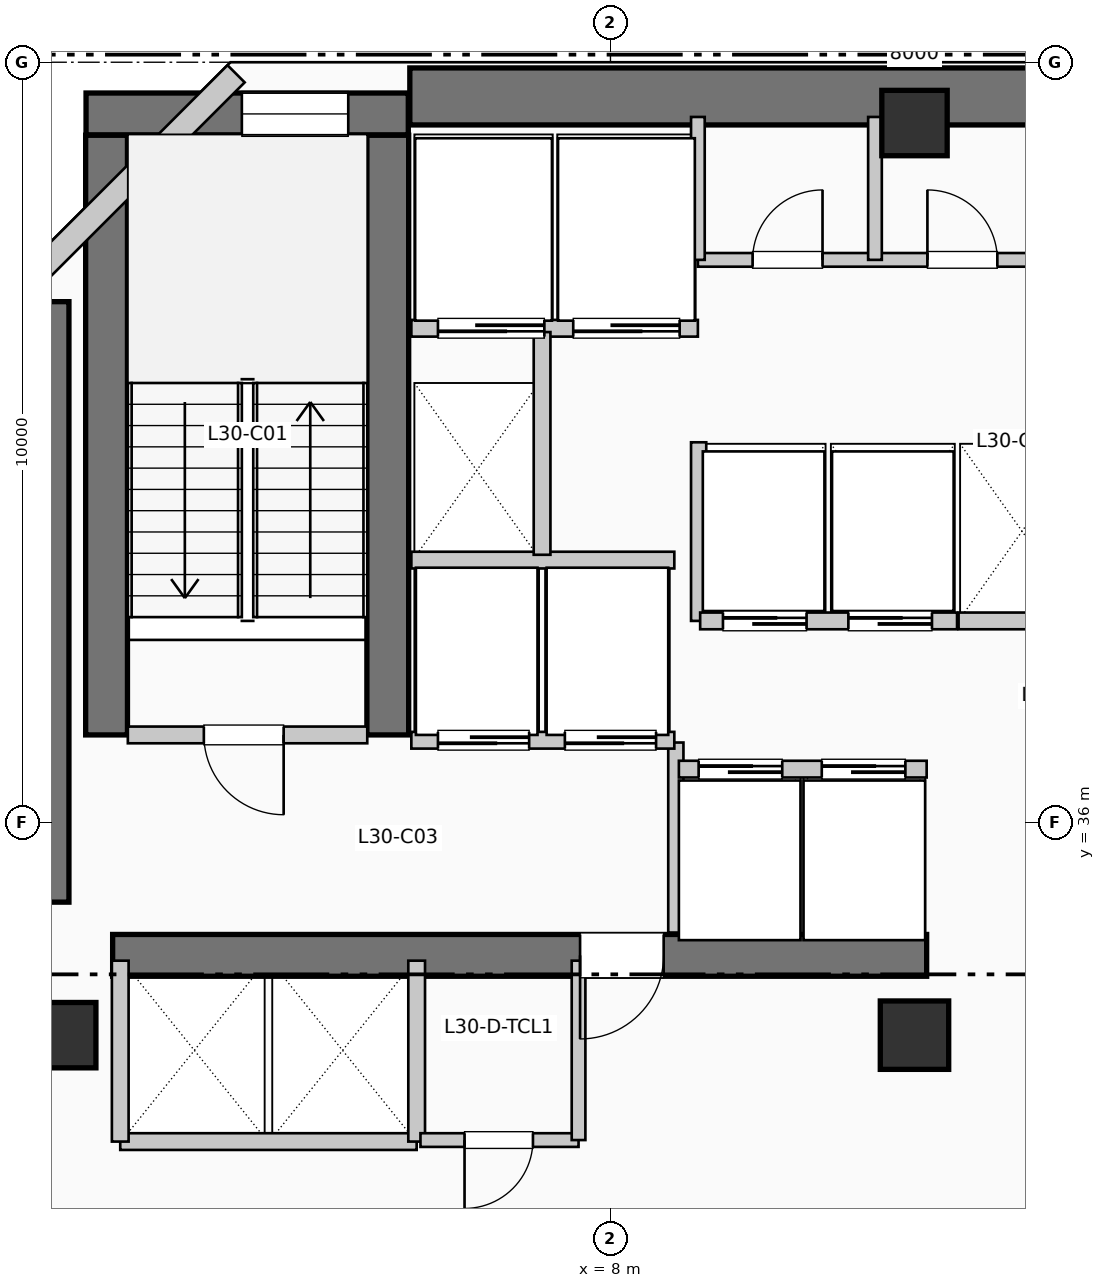
"""IFC4 building model, lengths in metres.
Left out: names, types, materials, properties, quantities, classifications, styles, units other than length and angle.
Written with IfcOpenShell. Run it as: python <this file> out.ifc"""

import sys

from ifc_helpers import new_model, si_unit, direction, frame, frame_2d, origin, origin_2d, place, context, subcontext, project, spatial, rectangle, extrude, element, fill, save


model = new_model("IFC4")
c1 = context("Model", 3, precision=1e-05, world=origin(), true_north=direction((0.0, 1.0)))
c2 = subcontext(c1, "Body", "Model", "MODEL_VIEW")
j1 = project(units=[si_unit("LENGTHUNIT", "METRE"), si_unit("PLANEANGLEUNIT", "RADIAN")], contexts=[c1])
p1 = place(None, origin())
s1 = spatial("IfcSite", under=j1, at=p1, CompositionType="ELEMENT")
p2 = place(p1, origin())
s2 = spatial("IfcBuilding", under=s1, at=p2, CompositionType="ELEMENT")
p3 = place(p2, frame((0.0, 0.0, 126.39)))
s3 = spatial("IfcBuildingStorey", under=s2, at=p3, CompositionType="ELEMENT", Elevation=126.39)
p4 = place(p3, frame((5.36, 45.55, 0.0), z_axis=(0.0, 0.0, 1.0), x_axis=(1.0, 0.0, 0.0)))
e1 = element("IfcWall", 1, at=p4, inside=s3, PredefinedType="SHEAR", context=c2, shape_type="SweptSolid", body=[
    extrude(rectangle(XDim=13.98, YDim=0.75, at=frame_2d((6.99, 0.0))), origin(), (0.0, 0.0, 1.0), 3.96),
])
p5 = place(p3, frame((0.5, 34.95, 0.0), z_axis=(0.0, 0.0, 1.0), x_axis=(0.0, 1.0, 0.0)))
e2 = element("IfcWall", 2, at=p5, inside=s3, PredefinedType="SHEAR", context=c2, shape_type="SweptSolid", body=[
    extrude(rectangle(XDim=7.9, YDim=0.75, at=frame_2d((3.95, 0.0))), origin(), (0.0, 0.0, 1.0), 3.96),
])
p6 = place(p3, frame((1.45, 34.25, 0.0), z_axis=(0.0, 0.0, 1.0), x_axis=(1.0, 0.0, 0.0)))
e3 = element("IfcWall", 3, at=p6, inside=s3, PredefinedType="SHEAR", context=c2, shape_type="SweptSolid", body=[
    extrude(rectangle(XDim=10.71, YDim=0.55, at=frame_2d((5.355, 0.0))), origin(), (0.0, 0.0, 1.0), 3.96),
])
p7 = place(p6, frame((7.25, 0.0, 0.0), z_axis=(0.0, 0.0, 1.0), x_axis=(-1.0, 0.0, 0.0)))
e4 = element("IfcOpeningElement", 4, at=p7, cuts=e3, PredefinedType="OPENING", context=c2, shape_type="SweptSolid", body=[
    extrude(rectangle(XDim=1.1, YDim=2.15, at=frame_2d((0.55, 1.075))), frame((0.0, 0.285, 0.0), z_axis=(0.0, -1.0, 0.0), x_axis=(1.0, 0.0, 0.0)), (0.0, 0.0, 1.0), 0.57),
])
for number, where, z_axis, x_axis in (
    (5, (1.37, 37.15, 0.0), (0.0, 0.0, 1.0), (0.0, 1.0, 0.0)),
    (6, (5.07, 37.15, 0.0), (0.0, 0.0, 1.0), (0.0, 1.0, 0.0)),
):
    element("IfcWall", number, at=place(p3, frame(where, z_axis=z_axis, x_axis=x_axis)), inside=s3, PredefinedType="SHEAR", context=c2, shape_type="SweptSolid", body=[
        extrude(rectangle(XDim=7.89, YDim=0.55, at=frame_2d((3.945, 0.0))), origin(), (0.0, 0.0, 1.0), 3.96),
    ])
p8 = place(p3, frame((1.1, 45.32, 0.0), z_axis=(0.0, 0.0, 1.0), x_axis=(1.0, 0.0, 0.0)))
e7 = element("IfcWall", 7, at=p8, inside=s3, PredefinedType="SHEAR", context=c2, shape_type="SweptSolid", body=[
    extrude(rectangle(XDim=4.24, YDim=0.55, at=frame_2d((2.12, 0.0))), origin(), (0.0, 0.0, 1.0), 3.96),
])
p9 = place(p8, frame((2.05, 0.0, 1.05)))
e8 = element("IfcOpeningElement", 8, at=p9, cuts=e7, PredefinedType="OPENING", context=c2, shape_type="SweptSolid", body=[
    extrude(rectangle(XDim=1.4, YDim=1.8, at=frame_2d((0.7, 0.9))), frame((0.0, 0.285, 0.0), z_axis=(0.0, -1.0, 0.0), x_axis=(1.0, 0.0, 0.0)), (0.0, 0.0, 1.0), 0.57),
])
p10 = place(p3, frame((0.8, 33.2, 0.0), z_axis=(0.0, 0.0, 1.0), x_axis=(1.0, 0.0, 0.0)))
e9 = element("IfcColumn", 9, at=p10, inside=s3, PredefinedType="COLUMN", context=c2, shape_type="SweptSolid", body=[
    extrude(rectangle(XDim=0.86, YDim=0.86, at=origin_2d()), origin(), (0.0, 0.0, 1.0), 3.96),
])
p11 = place(p3, frame((12.0, 33.2, 0.0), z_axis=(0.0, 0.0, 1.0), x_axis=(1.0, 0.0, 0.0)))
e10 = element("IfcColumn", 10, at=p11, inside=s3, PredefinedType="COLUMN", context=c2, shape_type="SweptSolid", body=[
    extrude(rectangle(XDim=0.9, YDim=0.9, at=origin_2d()), origin(), (0.0, 0.0, 1.0), 3.96),
])
p12 = place(p3, frame((12.0, 45.2, 0.0), z_axis=(0.0, 0.0, 1.0), x_axis=(1.0, 0.0, 0.0)))
e11 = element("IfcColumn", 11, at=p12, inside=s3, PredefinedType="COLUMN", context=c2, shape_type="SweptSolid", body=[
    extrude(rectangle(XDim=0.86, YDim=0.86, at=origin_2d()), origin(), (0.0, 0.0, 1.0), 3.96),
])
p13 = place(p3, frame((3.074, 45.848, 0.0), z_axis=(0.0, 0.0, 1.0), x_axis=(-0.707106781187, -0.707106781187, 0.0)))
e12 = element("IfcWall", 12, at=p13, inside=s3, PredefinedType="SOLIDWALL", context=c2, shape_type="SweptSolid", body=[
    extrude(rectangle(XDim=4.133, YDim=0.32, at=frame_2d((2.066, 0.0))), origin(), (0.0, 0.0, 1.0), 3.71),
])
p14 = place(p3, frame((1.65, 37.15, 0.0), z_axis=(0.0, 0.0, 1.0), x_axis=(1.0, 0.0, 0.0)))
e13 = element("IfcWall", 13, at=p14, inside=s3, PredefinedType="PARTITIONING", context=c2, shape_type="SweptSolid", body=[
    extrude(rectangle(XDim=3.15, YDim=0.22, at=frame_2d((1.575, 0.0))), origin(), (0.0, 0.0, 1.0), 3.71),
])
p15 = place(p14, frame((2.05, 0.0, 0.0), z_axis=(0.0, 0.0, 1.0), x_axis=(-1.0, 0.0, 0.0)))
e14 = element("IfcOpeningElement", 14, at=p15, cuts=e13, PredefinedType="OPENING", context=c2, shape_type="SweptSolid", body=[
    extrude(rectangle(XDim=1.05, YDim=2.15, at=frame_2d((0.525, 1.075))), frame((0.0, 0.12, 0.0), z_axis=(0.0, -1.0, 0.0), x_axis=(1.0, 0.0, 0.0)), (0.0, 0.0, 1.0), 0.24),
])
p16 = place(p3, frame((8.86, 34.55, 0.0), z_axis=(0.0, 0.0, 1.0), x_axis=(0.0, 1.0, 0.0)))
e15 = element("IfcWall", 15, at=p16, inside=s3, PredefinedType="PARTITIONING", context=c2, shape_type="SweptSolid", body=[
    extrude(rectangle(XDim=2.5, YDim=0.2, at=frame_2d((1.25, 0.0))), origin(), (0.0, 0.0, 1.0), 3.71),
])
p17 = place(p3, frame((5.38, 37.08, 0.0), z_axis=(0.0, 0.0, 1.0), x_axis=(1.0, 0.0, 0.0)))
e16 = element("IfcWall", 16, at=p17, inside=s3, PredefinedType="PARTITIONING", context=c2, shape_type="SweptSolid", body=[
    extrude(rectangle(XDim=3.46, YDim=0.22, at=frame_2d((1.73, 0.0))), origin(), (0.0, 0.0, 1.0), 3.71),
])
p18 = place(p17, frame((1.55, 0.0, 0.0), z_axis=(0.0, 0.0, 1.0), x_axis=(-1.0, 0.0, 0.0)))
e17 = element("IfcOpeningElement", 17, at=p18, cuts=e16, PredefinedType="OPENING", context=c2, shape_type="SweptSolid", body=[
    extrude(rectangle(XDim=1.2, YDim=2.2, at=frame_2d((0.6, 1.1))), frame((0.0, 0.12, 0.0), z_axis=(0.0, -1.0, 0.0), x_axis=(1.0, 0.0, 0.0)), (0.0, 0.0, 1.0), 0.24),
])
p19 = place(p17, frame((3.22, 0.0, 0.0), z_axis=(0.0, 0.0, 1.0), x_axis=(-1.0, 0.0, 0.0)))
e18 = element("IfcOpeningElement", 18, at=p19, cuts=e16, PredefinedType="OPENING", context=c2, shape_type="SweptSolid", body=[
    extrude(rectangle(XDim=1.2, YDim=2.2, at=frame_2d((0.6, 1.1))), frame((0.0, 0.12, 0.0), z_axis=(0.0, -1.0, 0.0), x_axis=(1.0, 0.0, 0.0)), (0.0, 0.0, 1.0), 0.24),
])
p20 = place(p3, frame((5.38, 39.45, 0.0), z_axis=(0.0, 0.0, 1.0), x_axis=(1.0, 0.0, 0.0)))
e19 = element("IfcWall", 19, at=p20, inside=s3, PredefinedType="PARTITIONING", context=c2, shape_type="SweptSolid", body=[
    extrude(rectangle(XDim=3.46, YDim=0.22, at=frame_2d((1.73, 0.0))), origin(), (0.0, 0.0, 1.0), 3.71),
])
p21 = place(p3, frame((5.38, 42.5, 0.0), z_axis=(0.0, 0.0, 1.0), x_axis=(1.0, 0.0, 0.0)))
e20 = element("IfcWall", 20, at=p21, inside=s3, PredefinedType="PARTITIONING", context=c2, shape_type="SweptSolid", body=[
    extrude(rectangle(XDim=3.77, YDim=0.22, at=frame_2d((1.885, 0.0))), origin(), (0.0, 0.0, 1.0), 3.71),
])
p22 = place(p21, frame((1.75, 0.0, 0.0), z_axis=(0.0, 0.0, 1.0), x_axis=(-1.0, 0.0, 0.0)))
e21 = element("IfcOpeningElement", 21, at=p22, cuts=e20, PredefinedType="OPENING", context=c2, shape_type="SweptSolid", body=[
    extrude(rectangle(XDim=1.4, YDim=2.2, at=frame_2d((0.7, 1.1))), frame((0.0, 0.12, 0.0), z_axis=(0.0, -1.0, 0.0), x_axis=(1.0, 0.0, 0.0)), (0.0, 0.0, 1.0), 0.24),
])
p23 = place(p21, frame((3.53, 0.0, 0.0), z_axis=(0.0, 0.0, 1.0), x_axis=(-1.0, 0.0, 0.0)))
e22 = element("IfcOpeningElement", 22, at=p23, cuts=e20, PredefinedType="OPENING", context=c2, shape_type="SweptSolid", body=[
    extrude(rectangle(XDim=1.4, YDim=2.2, at=frame_2d((0.7, 1.1))), frame((0.0, 0.12, 0.0), z_axis=(0.0, -1.0, 0.0), x_axis=(1.0, 0.0, 0.0)), (0.0, 0.0, 1.0), 0.24),
])
p24 = place(p3, frame((7.1, 39.52, 0.0), z_axis=(0.0, 0.0, 1.0), x_axis=(0.0, 1.0, 0.0)))
e23 = element("IfcWall", 23, at=p24, inside=s3, PredefinedType="PARTITIONING", context=c2, shape_type="SweptSolid", body=[
    extrude(rectangle(XDim=2.93, YDim=0.22, at=frame_2d((1.465, 0.0))), origin(), (0.0, 0.0, 1.0), 3.71),
])
p25 = place(p3, frame((1.55, 31.8, 0.0), z_axis=(0.0, 0.0, 1.0), x_axis=(1.0, 0.0, 0.0)))
e24 = element("IfcWall", 24, at=p25, inside=s3, PredefinedType="PARTITIONING", context=c2, shape_type="SweptSolid", body=[
    extrude(rectangle(XDim=3.9, YDim=0.22, at=frame_2d((1.95, 0.0))), origin(), (0.0, 0.0, 1.0), 3.71),
])
for number, where, z_axis, x_axis in (
    (25, (1.55, 31.8, 0.0), (0.0, 0.0, 1.0), (0.0, 1.0, 0.0)),
    (26, (5.45, 31.8, 0.0), (0.0, 0.0, 1.0), (0.0, 1.0, 0.0)),
):
    element("IfcWall", number, at=place(p3, frame(where, z_axis=z_axis, x_axis=x_axis)), inside=s3, PredefinedType="PARTITIONING", context=c2, shape_type="SweptSolid", body=[
        extrude(rectangle(XDim=2.38, YDim=0.22, at=frame_2d((1.19, 0.0))), origin(), (0.0, 0.0, 1.0), 3.71),
    ])
p26 = place(p3, frame((9.16, 38.65, 0.0), z_axis=(0.0, 0.0, 1.0), x_axis=(0.0, 1.0, 0.0)))
e27 = element("IfcWall", 27, at=p26, inside=s3, PredefinedType="PARTITIONING", context=c2, shape_type="SweptSolid", body=[
    extrude(rectangle(XDim=2.35, YDim=0.2, at=frame_2d((1.175, 0.0))), origin(), (0.0, 0.0, 1.0), 3.71),
])
p27 = place(p3, frame((5.5, 31.82, 0.0), z_axis=(0.0, 0.0, 1.0), x_axis=(1.0, 0.0, 0.0)))
e28 = element("IfcWall", 28, at=p27, inside=s3, PredefinedType="PLUMBINGWALL", context=c2, shape_type="SweptSolid", body=[
    extrude(rectangle(XDim=2.08, YDim=0.18, at=frame_2d((1.04, 0.0))), origin(), (0.0, 0.0, 1.0), 3.71),
])
p28 = place(p27, frame((1.48, 0.0, 0.0), z_axis=(0.0, 0.0, 1.0), x_axis=(-1.0, 0.0, 0.0)))
e29 = element("IfcOpeningElement", 29, at=p28, cuts=e28, PredefinedType="OPENING", context=c2, shape_type="SweptSolid", body=[
    extrude(rectangle(XDim=0.9, YDim=2.1, at=frame_2d((0.45, 1.05))), frame((0.0, 0.1, 0.0), z_axis=(0.0, -1.0, 0.0), x_axis=(1.0, 0.0, 0.0)), (0.0, 0.0, 1.0), 0.2),
])
p29 = place(p3, frame((7.58, 31.82, 0.0), z_axis=(0.0, 0.0, 1.0), x_axis=(0.0, 1.0, 0.0)))
e30 = element("IfcWall", 30, at=p29, inside=s3, PredefinedType="PLUMBINGWALL", context=c2, shape_type="SweptSolid", body=[
    extrude(rectangle(XDim=2.36, YDim=0.18, at=frame_2d((1.18, 0.0))), origin(), (0.0, 0.0, 1.0), 3.71),
])
p30 = place(p3, frame((8.9, 36.7, 0.0), z_axis=(0.0, 0.0, 1.0), x_axis=(1.0, 0.0, 0.0)))
e31 = element("IfcWall", 31, at=p30, inside=s3, PredefinedType="PARTITIONING", context=c2, shape_type="SweptSolid", body=[
    extrude(rectangle(XDim=3.26, YDim=0.22, at=frame_2d((1.63, 0.0))), origin(), (0.0, 0.0, 1.0), 3.71),
])
p31 = place(p30, frame((0.26, 0.0, 0.0)))
e32 = element("IfcOpeningElement", 32, at=p31, cuts=e31, PredefinedType="OPENING", context=c2, shape_type="SweptSolid", body=[
    extrude(rectangle(XDim=1.1, YDim=2.2, at=frame_2d((0.55, 1.1))), frame((0.0, 0.12, 0.0), z_axis=(0.0, -1.0, 0.0), x_axis=(1.0, 0.0, 0.0)), (0.0, 0.0, 1.0), 0.24),
])
p32 = place(p30, frame((1.88, 0.0, 0.0)))
e33 = element("IfcOpeningElement", 33, at=p32, cuts=e31, PredefinedType="OPENING", context=c2, shape_type="SweptSolid", body=[
    extrude(rectangle(XDim=1.1, YDim=2.2, at=frame_2d((0.55, 1.1))), frame((0.0, 0.12, 0.0), z_axis=(0.0, -1.0, 0.0), x_axis=(1.0, 0.0, 0.0)), (0.0, 0.0, 1.0), 0.24),
])
p33 = place(p3, frame((9.18, 38.65, 0.0), z_axis=(0.0, 0.0, 1.0), x_axis=(1.0, 0.0, 0.0)))
e34 = element("IfcWall", 34, at=p33, inside=s3, PredefinedType="PARTITIONING", context=c2, shape_type="SweptSolid", body=[
    extrude(rectangle(XDim=3.38, YDim=0.22, at=frame_2d((1.69, 0.0))), origin(), (0.0, 0.0, 1.0), 3.71),
])
p34 = place(p33, frame((0.3, 0.0, 0.0)))
e35 = element("IfcOpeningElement", 35, at=p34, cuts=e34, PredefinedType="OPENING", context=c2, shape_type="SweptSolid", body=[
    extrude(rectangle(XDim=1.1, YDim=2.2, at=frame_2d((0.55, 1.1))), frame((0.0, 0.12, 0.0), z_axis=(0.0, -1.0, 0.0), x_axis=(1.0, 0.0, 0.0)), (0.0, 0.0, 1.0), 0.24),
])
p35 = place(p33, frame((1.95, 0.0, 0.0)))
e36 = element("IfcOpeningElement", 36, at=p35, cuts=e34, PredefinedType="OPENING", context=c2, shape_type="SweptSolid", body=[
    extrude(rectangle(XDim=1.1, YDim=2.2, at=frame_2d((0.55, 1.1))), frame((0.0, 0.12, 0.0), z_axis=(0.0, -1.0, 0.0), x_axis=(1.0, 0.0, 0.0)), (0.0, 0.0, 1.0), 0.24),
])
p36 = place(p3, frame((12.58, 38.65, 0.0), z_axis=(0.0, 0.0, 1.0), x_axis=(1.0, 0.0, 0.0)))
e37 = element("IfcWall", 37, at=p36, inside=s3, PredefinedType="PARTITIONING", context=c2, shape_type="SweptSolid", body=[
    extrude(rectangle(XDim=3.38, YDim=0.22, at=frame_2d((1.69, 0.0))), origin(), (0.0, 0.0, 1.0), 3.71),
])
p37 = place(p3, frame((9.15, 43.4, 0.0), z_axis=(0.0, 0.0, 1.0), x_axis=(1.0, 0.0, 0.0)))
e38 = element("IfcWall", 38, at=p37, inside=s3, PredefinedType="PLUMBINGWALL", context=c2, shape_type="SweptSolid", body=[
    extrude(rectangle(XDim=9.33, YDim=0.18, at=frame_2d((4.665, 0.0))), origin(), (0.0, 0.0, 1.0), 3.71),
])
p38 = place(p37, frame((0.72, 0.0, 0.0)))
e39 = element("IfcOpeningElement", 39, at=p38, cuts=e38, PredefinedType="OPENING", context=c2, shape_type="SweptSolid", body=[
    extrude(rectangle(XDim=0.92, YDim=2.1, at=frame_2d((0.46, 1.05))), frame((0.0, 0.1, 0.0), z_axis=(0.0, -1.0, 0.0), x_axis=(1.0, 0.0, 0.0)), (0.0, 0.0, 1.0), 0.2),
])
p39 = place(p37, frame((3.02, 0.0, 0.0)))
e40 = element("IfcOpeningElement", 40, at=p39, cuts=e38, PredefinedType="OPENING", context=c2, shape_type="SweptSolid", body=[
    extrude(rectangle(XDim=0.92, YDim=2.1, at=frame_2d((0.46, 1.05))), frame((0.0, 0.1, 0.0), z_axis=(0.0, -1.0, 0.0), x_axis=(1.0, 0.0, 0.0)), (0.0, 0.0, 1.0), 0.2),
])
p40 = place(p37, frame((5.34, 0.0, 0.0)))
e41 = element("IfcOpeningElement", 41, at=p40, cuts=e38, PredefinedType="OPENING", context=c2, shape_type="SweptSolid", body=[
    extrude(rectangle(XDim=0.92, YDim=2.1, at=frame_2d((0.46, 1.05))), frame((0.0, 0.1, 0.0), z_axis=(0.0, -1.0, 0.0), x_axis=(1.0, 0.0, 0.0)), (0.0, 0.0, 1.0), 0.2),
])
p41 = place(p37, frame((7.66, 0.0, 0.0)))
e42 = element("IfcOpeningElement", 42, at=p41, cuts=e38, PredefinedType="OPENING", context=c2, shape_type="SweptSolid", body=[
    extrude(rectangle(XDim=0.95, YDim=2.1, at=frame_2d((0.475, 1.05))), frame((0.0, 0.1, 0.0), z_axis=(0.0, -1.0, 0.0), x_axis=(1.0, 0.0, 0.0)), (0.0, 0.0, 1.0), 0.2),
])
for number, where, z_axis, x_axis in (
    (43, (9.15, 43.4, 0.0), (0.0, 0.0, 1.0), (0.0, 1.0, 0.0)),
    (44, (11.48, 43.4, 0.0), (0.0, 0.0, 1.0), (0.0, 1.0, 0.0)),
):
    element("IfcWall", number, at=place(p3, frame(where, z_axis=z_axis, x_axis=x_axis)), inside=s3, PredefinedType="PLUMBINGWALL", context=c2, shape_type="SweptSolid", body=[
        extrude(rectangle(XDim=1.88, YDim=0.18, at=frame_2d((0.94, 0.0))), origin(), (0.0, 0.0, 1.0), 3.71),
    ])
p42 = place(p9, origin())
e45 = element("IfcWindow", 45, at=p42, inside=s3, PartitioningType="SINGLE_PANEL", PredefinedType="WINDOW", context=c2, shape_type="SweptSolid", body=[
    extrude(rectangle(XDim=1.4, YDim=1.8, at=frame_2d((0.7, 0.9))), frame((0.0, 0.03, 0.0), z_axis=(0.0, -1.0, 0.0), x_axis=(1.0, 0.0, 0.0)), (0.0, 0.0, 1.0), 0.06),
])
fill(e8, e45)
p43 = place(p15, origin())
e46 = element("IfcDoor", 46, at=p43, inside=s3, OperationType="SINGLE_SWING_RIGHT", PredefinedType="DOOR", context=c2, shape_type="SweptSolid", body=[
    extrude(rectangle(XDim=1.05, YDim=2.15, at=frame_2d((0.525, 1.075))), frame((0.0, 0.025, 0.0), z_axis=(0.0, -1.0, 0.0), x_axis=(1.0, 0.0, 0.0)), (0.0, 0.0, 1.0), 0.05),
])
fill(e14, e46)
p44 = place(p7, origin())
e47 = element("IfcDoor", 47, at=p44, inside=s3, OperationType="SINGLE_SWING_LEFT", PredefinedType="DOOR", context=c2, shape_type="SweptSolid", body=[
    extrude(rectangle(XDim=1.1, YDim=2.15, at=frame_2d((0.55, 1.075))), frame((0.0, 0.025, 0.0), z_axis=(0.0, -1.0, 0.0), x_axis=(1.0, 0.0, 0.0)), (0.0, 0.0, 1.0), 0.05),
])
fill(e4, e47)
p45 = place(p18, origin())
e48 = element("IfcDoor", 48, at=p45, inside=s3, OperationType="SLIDING_TO_RIGHT", PredefinedType="DOOR", context=c2, shape_type="SweptSolid", body=[
    extrude(rectangle(XDim=1.2, YDim=2.2, at=frame_2d((0.6, 1.1))), frame((0.0, 0.025, 0.0), z_axis=(0.0, -1.0, 0.0), x_axis=(1.0, 0.0, 0.0)), (0.0, 0.0, 1.0), 0.05),
])
fill(e17, e48)
p46 = place(p19, origin())
e49 = element("IfcDoor", 49, at=p46, inside=s3, OperationType="SLIDING_TO_RIGHT", PredefinedType="DOOR", context=c2, shape_type="SweptSolid", body=[
    extrude(rectangle(XDim=1.2, YDim=2.2, at=frame_2d((0.6, 1.1))), frame((0.0, 0.025, 0.0), z_axis=(0.0, -1.0, 0.0), x_axis=(1.0, 0.0, 0.0)), (0.0, 0.0, 1.0), 0.05),
])
fill(e18, e49)
p47 = place(p22, origin())
e50 = element("IfcDoor", 50, at=p47, inside=s3, OperationType="SLIDING_TO_LEFT", PredefinedType="DOOR", context=c2, shape_type="SweptSolid", body=[
    extrude(rectangle(XDim=1.4, YDim=2.2, at=frame_2d((0.7, 1.1))), frame((0.0, 0.025, 0.0), z_axis=(0.0, -1.0, 0.0), x_axis=(1.0, 0.0, 0.0)), (0.0, 0.0, 1.0), 0.05),
])
fill(e21, e50)
p48 = place(p23, origin())
e51 = element("IfcDoor", 51, at=p48, inside=s3, OperationType="SLIDING_TO_LEFT", PredefinedType="DOOR", context=c2, shape_type="SweptSolid", body=[
    extrude(rectangle(XDim=1.4, YDim=2.2, at=frame_2d((0.7, 1.1))), frame((0.0, 0.025, 0.0), z_axis=(0.0, -1.0, 0.0), x_axis=(1.0, 0.0, 0.0)), (0.0, 0.0, 1.0), 0.05),
])
fill(e22, e51)
p49 = place(p28, origin())
e52 = element("IfcDoor", 52, at=p49, inside=s3, OperationType="SINGLE_SWING_LEFT", PredefinedType="DOOR", context=c2, shape_type="SweptSolid", body=[
    extrude(rectangle(XDim=0.9, YDim=2.1, at=frame_2d((0.45, 1.05))), frame((0.0, 0.025, 0.0), z_axis=(0.0, -1.0, 0.0), x_axis=(1.0, 0.0, 0.0)), (0.0, 0.0, 1.0), 0.05),
])
fill(e29, e52)
p50 = place(p31, origin())
e53 = element("IfcDoor", 53, at=p50, inside=s3, OperationType="SLIDING_TO_LEFT", PredefinedType="DOOR", context=c2, shape_type="SweptSolid", body=[
    extrude(rectangle(XDim=1.1, YDim=2.2, at=frame_2d((0.55, 1.1))), frame((0.0, 0.025, 0.0), z_axis=(0.0, -1.0, 0.0), x_axis=(1.0, 0.0, 0.0)), (0.0, 0.0, 1.0), 0.05),
])
fill(e32, e53)
p51 = place(p32, origin())
e54 = element("IfcDoor", 54, at=p51, inside=s3, OperationType="SLIDING_TO_LEFT", PredefinedType="DOOR", context=c2, shape_type="SweptSolid", body=[
    extrude(rectangle(XDim=1.1, YDim=2.2, at=frame_2d((0.55, 1.1))), frame((0.0, 0.025, 0.0), z_axis=(0.0, -1.0, 0.0), x_axis=(1.0, 0.0, 0.0)), (0.0, 0.0, 1.0), 0.05),
])
fill(e33, e54)
p52 = place(p34, origin())
e55 = element("IfcDoor", 55, at=p52, inside=s3, OperationType="SLIDING_TO_LEFT", PredefinedType="DOOR", context=c2, shape_type="SweptSolid", body=[
    extrude(rectangle(XDim=1.1, YDim=2.2, at=frame_2d((0.55, 1.1))), frame((0.0, 0.025, 0.0), z_axis=(0.0, -1.0, 0.0), x_axis=(1.0, 0.0, 0.0)), (0.0, 0.0, 1.0), 0.05),
])
fill(e35, e55)
p53 = place(p35, origin())
e56 = element("IfcDoor", 56, at=p53, inside=s3, OperationType="SLIDING_TO_LEFT", PredefinedType="DOOR", context=c2, shape_type="SweptSolid", body=[
    extrude(rectangle(XDim=1.1, YDim=2.2, at=frame_2d((0.55, 1.1))), frame((0.0, 0.025, 0.0), z_axis=(0.0, -1.0, 0.0), x_axis=(1.0, 0.0, 0.0)), (0.0, 0.0, 1.0), 0.05),
])
fill(e36, e56)
p54 = place(p38, origin())
e57 = element("IfcDoor", 57, at=p54, inside=s3, OperationType="SINGLE_SWING_RIGHT", PredefinedType="DOOR", context=c2, shape_type="SweptSolid", body=[
    extrude(rectangle(XDim=0.92, YDim=2.1, at=frame_2d((0.46, 1.05))), frame((0.0, 0.025, 0.0), z_axis=(0.0, -1.0, 0.0), x_axis=(1.0, 0.0, 0.0)), (0.0, 0.0, 1.0), 0.05),
])
fill(e39, e57)
p55 = place(p39, origin())
e58 = element("IfcDoor", 58, at=p55, inside=s3, OperationType="SINGLE_SWING_LEFT", PredefinedType="DOOR", context=c2, shape_type="SweptSolid", body=[
    extrude(rectangle(XDim=0.92, YDim=2.1, at=frame_2d((0.46, 1.05))), frame((0.0, 0.025, 0.0), z_axis=(0.0, -1.0, 0.0), x_axis=(1.0, 0.0, 0.0)), (0.0, 0.0, 1.0), 0.05),
])
fill(e40, e58)
save(model, sys.argv[1])
